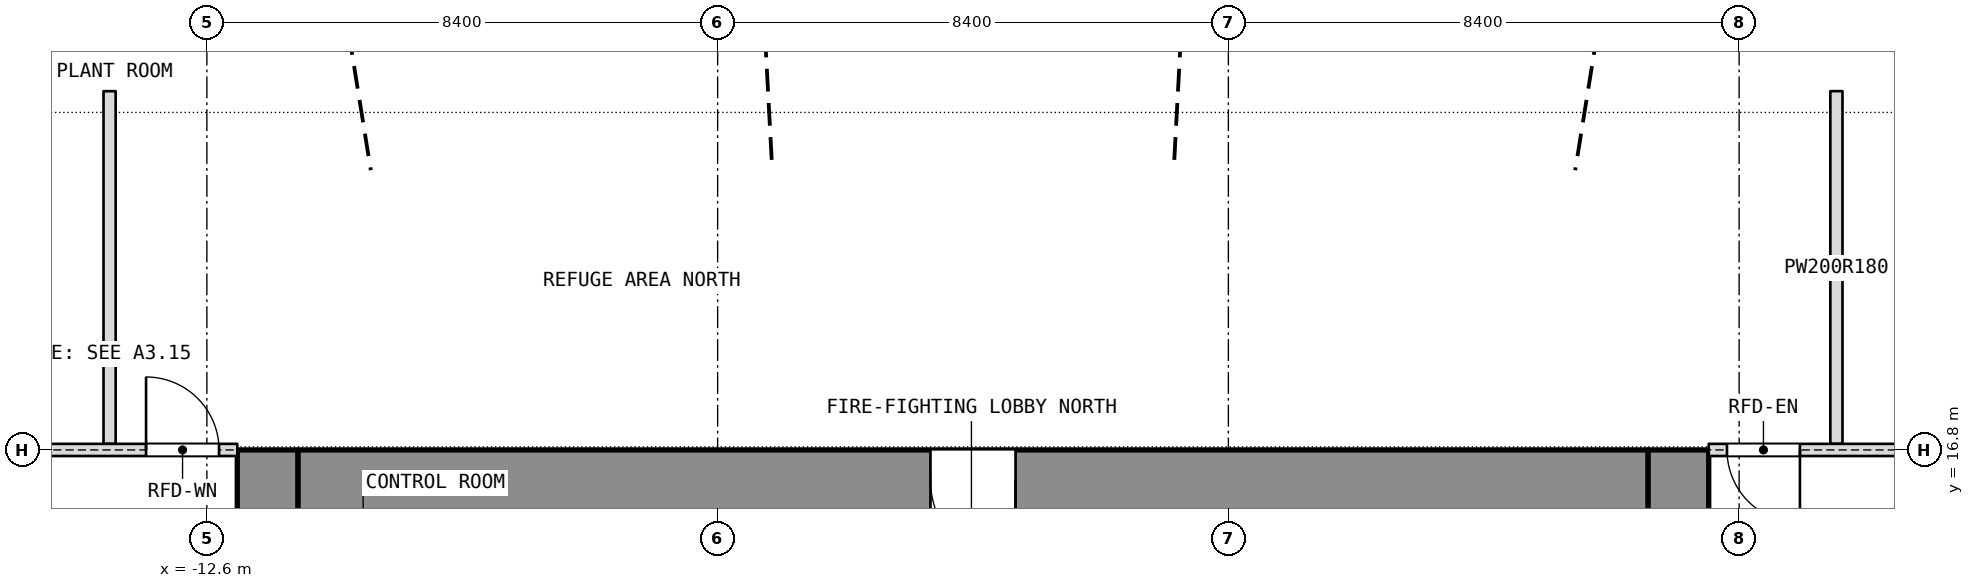
"""IFC4 building model, lengths in metres.
Left out: names, types, materials, properties, quantities, classifications, styles, units other than length and angle.
Written with IfcOpenShell. Run it as: python <this file> out.ifc"""

import sys

from ifc_helpers import new_model, si_unit, direction, frame, frame_2d, origin, place, context, subcontext, project, spatial, rectangle, extrude, element, fill, save


model = new_model("IFC4")
c1 = context("Model", 3, precision=1e-05, world=origin(), true_north=direction((0.0, 1.0)))
c2 = subcontext(c1, "Body", "Model", "MODEL_VIEW")
j1 = project(units=[si_unit("LENGTHUNIT", "METRE"), si_unit("PLANEANGLEUNIT", "RADIAN")], contexts=[c1])
p1 = place(None, origin())
s1 = spatial("IfcSite", under=j1, at=p1, CompositionType="ELEMENT")
p2 = place(p1, origin())
s2 = spatial("IfcBuilding", under=s1, at=p2, CompositionType="ELEMENT")
p3 = place(p2, frame((0.0, 0.0, 169.7)))
s3 = spatial("IfcBuildingStorey", under=s2, at=p3, CompositionType="ELEMENT", Elevation=169.7)
p4 = place(p3, frame((11.6, 0.0, 0.0), z_axis=(0.0, 0.0, 1.0), x_axis=(0.0, 1.0, 0.0)))
e1 = element("IfcWall", 1, at=p4, inside=s3, PredefinedType="SHEAR", context=c2, shape_type="SweptSolid", body=[
    extrude(rectangle(XDim=16.8, YDim=1.0, at=frame_2d((8.4, 0.0))), origin(), (0.0, 0.0, 1.0), 10.8),
])
p5 = place(p4, frame((6.825, 0.0, 0.0)))
e2 = element("IfcOpeningElement", 2, at=p5, cuts=e1, PredefinedType="OPENING", context=c2, shape_type="SweptSolid", body=[
    extrude(rectangle(XDim=1.2, YDim=2.1, at=frame_2d((0.6, 1.05))), frame((0.0, 0.5, 0.0), z_axis=(0.0, -1.0, 0.0), x_axis=(1.0, 0.0, 0.0)), (0.0, 0.0, 1.0), 1.0),
])
p6 = place(p4, frame((8.775, 0.0, 0.0)))
e3 = element("IfcOpeningElement", 3, at=p6, cuts=e1, PredefinedType="OPENING", context=c2, shape_type="SweptSolid", body=[
    extrude(rectangle(XDim=1.2, YDim=2.1, at=frame_2d((0.6, 1.05))), frame((0.0, 0.5, 0.0), z_axis=(0.0, -1.0, 0.0), x_axis=(1.0, 0.0, 0.0)), (0.0, 0.0, 1.0), 1.0),
])
p7 = place(p3, frame((-11.6, 0.0, 0.0), z_axis=(0.0, 0.0, 1.0), x_axis=(0.0, 1.0, 0.0)))
e4 = element("IfcWall", 4, at=p7, inside=s3, PredefinedType="SHEAR", context=c2, shape_type="SweptSolid", body=[
    extrude(rectangle(XDim=16.8, YDim=1.0, at=frame_2d((8.4, 0.0))), origin(), (0.0, 0.0, 1.0), 10.8),
])
p8 = place(p7, frame((3.6, 0.0, 0.0)))
e5 = element("IfcOpeningElement", 5, at=p8, cuts=e4, PredefinedType="OPENING", context=c2, shape_type="SweptSolid", body=[
    extrude(rectangle(XDim=0.9, YDim=2.1, at=frame_2d((0.45, 1.05))), frame((0.0, 0.5, 0.0), z_axis=(0.0, -1.0, 0.0), x_axis=(1.0, 0.0, 0.0)), (0.0, 0.0, 1.0), 1.0),
])
p9 = place(p7, frame((6.825, 0.0, 0.0)))
e6 = element("IfcOpeningElement", 6, at=p9, cuts=e4, PredefinedType="OPENING", context=c2, shape_type="SweptSolid", body=[
    extrude(rectangle(XDim=1.2, YDim=2.1, at=frame_2d((0.6, 1.05))), frame((0.0, 0.5, 0.0), z_axis=(0.0, -1.0, 0.0), x_axis=(1.0, 0.0, 0.0)), (0.0, 0.0, 1.0), 1.0),
])
p10 = place(p7, frame((12.3, 0.0, 0.0)))
e7 = element("IfcOpeningElement", 7, at=p10, cuts=e4, PredefinedType="OPENING", context=c2, shape_type="SweptSolid", body=[
    extrude(rectangle(XDim=0.9, YDim=2.1, at=frame_2d((0.45, 1.05))), frame((0.0, 0.5, 0.0), z_axis=(0.0, -1.0, 0.0), x_axis=(1.0, 0.0, 0.0)), (0.0, 0.0, 1.0), 1.0),
])
p11 = place(p7, frame((8.775, 0.0, 0.0)))
e8 = element("IfcOpeningElement", 8, at=p11, cuts=e4, PredefinedType="OPENING", context=c2, shape_type="SweptSolid", body=[
    extrude(rectangle(XDim=1.2, YDim=2.1, at=frame_2d((0.6, 1.05))), frame((0.0, 0.5, 0.0), z_axis=(0.0, -1.0, 0.0), x_axis=(1.0, 0.0, 0.0)), (0.0, 0.0, 1.0), 1.0),
])
p12 = place(p3, frame((-11.1, 16.3, 0.0), z_axis=(0.0, 0.0, 1.0), x_axis=(1.0, 0.0, 0.0)))
e9 = element("IfcWall", 9, at=p12, inside=s3, PredefinedType="SHEAR", context=c2, shape_type="SweptSolid", body=[
    extrude(rectangle(XDim=22.2, YDim=1.0, at=frame_2d((11.1, 0.0))), origin(), (0.0, 0.0, 1.0), 10.8),
])
p13 = place(p12, frame((10.4, 0.0, 0.0)))
e10 = element("IfcOpeningElement", 10, at=p13, cuts=e9, PredefinedType="OPENING", context=c2, shape_type="SweptSolid", body=[
    extrude(rectangle(XDim=1.4, YDim=2.1, at=frame_2d((0.7, 1.05))), frame((0.0, 0.5, 0.0), z_axis=(0.0, -1.0, 0.0), x_axis=(1.0, 0.0, 0.0)), (0.0, 0.0, 1.0), 1.0),
])
for number, where, z_axis, x_axis in (
    (11, (14.2, 16.9, 0.0), (0.0, 0.0, 1.0), (0.0, 1.0, 0.0)),
    (12, (-14.2, 16.9, 0.0), (0.0, 0.0, 1.0), (0.0, 1.0, 0.0)),
):
    element("IfcWall", number, at=place(p3, frame(where, z_axis=z_axis, x_axis=x_axis)), inside=s3, PredefinedType="PARTITIONING", context=c2, shape_type="SweptSolid", body=[
        extrude(rectangle(XDim=5.8, YDim=0.2, at=frame_2d((2.9, 0.0))), origin(), (0.0, 0.0, 1.0), 10.54),
    ])
p14 = place(p3, frame((-16.7, 16.8, 0.0), z_axis=(0.0, 0.0, 1.0), x_axis=(1.0, 0.0, 0.0)))
e13 = element("IfcWall", 13, at=p14, inside=s3, PredefinedType="PARTITIONING", context=c2, shape_type="SweptSolid", body=[
    extrude(rectangle(XDim=4.6, YDim=0.2, at=frame_2d((2.3, 0.0))), origin(), (0.0, 0.0, 1.0), 10.14),
])
p15 = place(p14, frame((3.1, 0.0, 0.0)))
e14 = element("IfcOpeningElement", 14, at=p15, cuts=e13, PredefinedType="OPENING", context=c2, shape_type="SweptSolid", body=[
    extrude(rectangle(XDim=1.2, YDim=2.1, at=frame_2d((0.6, 1.05))), frame((0.0, 0.1, 0.0), z_axis=(0.0, -1.0, 0.0), x_axis=(1.0, 0.0, 0.0)), (0.0, 0.0, 1.0), 0.2),
])
p16 = place(p3, frame((12.1, 16.8, 0.0), z_axis=(0.0, 0.0, 1.0), x_axis=(1.0, 0.0, 0.0)))
e15 = element("IfcWall", 15, at=p16, inside=s3, PredefinedType="PARTITIONING", context=c2, shape_type="SweptSolid", body=[
    extrude(rectangle(XDim=4.6, YDim=0.2, at=frame_2d((2.3, 0.0))), origin(), (0.0, 0.0, 1.0), 10.14),
])
p17 = place(p16, frame((0.3, 0.0, 0.0)))
e16 = element("IfcOpeningElement", 16, at=p17, cuts=e15, PredefinedType="OPENING", context=c2, shape_type="SweptSolid", body=[
    extrude(rectangle(XDim=1.2, YDim=2.1, at=frame_2d((0.6, 1.05))), frame((0.0, 0.1, 0.0), z_axis=(0.0, -1.0, 0.0), x_axis=(1.0, 0.0, 0.0)), (0.0, 0.0, 1.0), 0.2),
])
p18 = place(p13, origin())
e17 = element("IfcDoor", 17, at=p18, inside=s3, OperationType="SINGLE_SWING_LEFT", PredefinedType="DOOR", context=c2, shape_type="SweptSolid", body=[
    extrude(rectangle(XDim=1.4, YDim=2.1, at=frame_2d((0.7, 1.05))), frame((0.0, 0.025, 0.0), z_axis=(0.0, -1.0, 0.0), x_axis=(1.0, 0.0, 0.0)), (0.0, 0.0, 1.0), 0.05),
])
fill(e10, e17)
p19 = place(p15, origin())
e18 = element("IfcDoor", 18, at=p19, inside=s3, OperationType="SINGLE_SWING_LEFT", PredefinedType="DOOR", context=c2, shape_type="SweptSolid", body=[
    extrude(rectangle(XDim=1.2, YDim=2.1, at=frame_2d((0.6, 1.05))), frame((0.0, 0.025, 0.0), z_axis=(0.0, -1.0, 0.0), x_axis=(1.0, 0.0, 0.0)), (0.0, 0.0, 1.0), 0.05),
])
fill(e14, e18)
p20 = place(p17, origin())
e19 = element("IfcDoor", 19, at=p20, inside=s3, OperationType="SINGLE_SWING_LEFT", PredefinedType="DOOR", context=c2, shape_type="SweptSolid", body=[
    extrude(rectangle(XDim=1.2, YDim=2.1, at=frame_2d((0.6, 1.05))), frame((0.0, 0.025, 0.0), z_axis=(0.0, -1.0, 0.0), x_axis=(1.0, 0.0, 0.0)), (0.0, 0.0, 1.0), 0.05),
])
fill(e16, e19)
save(model, sys.argv[1])
